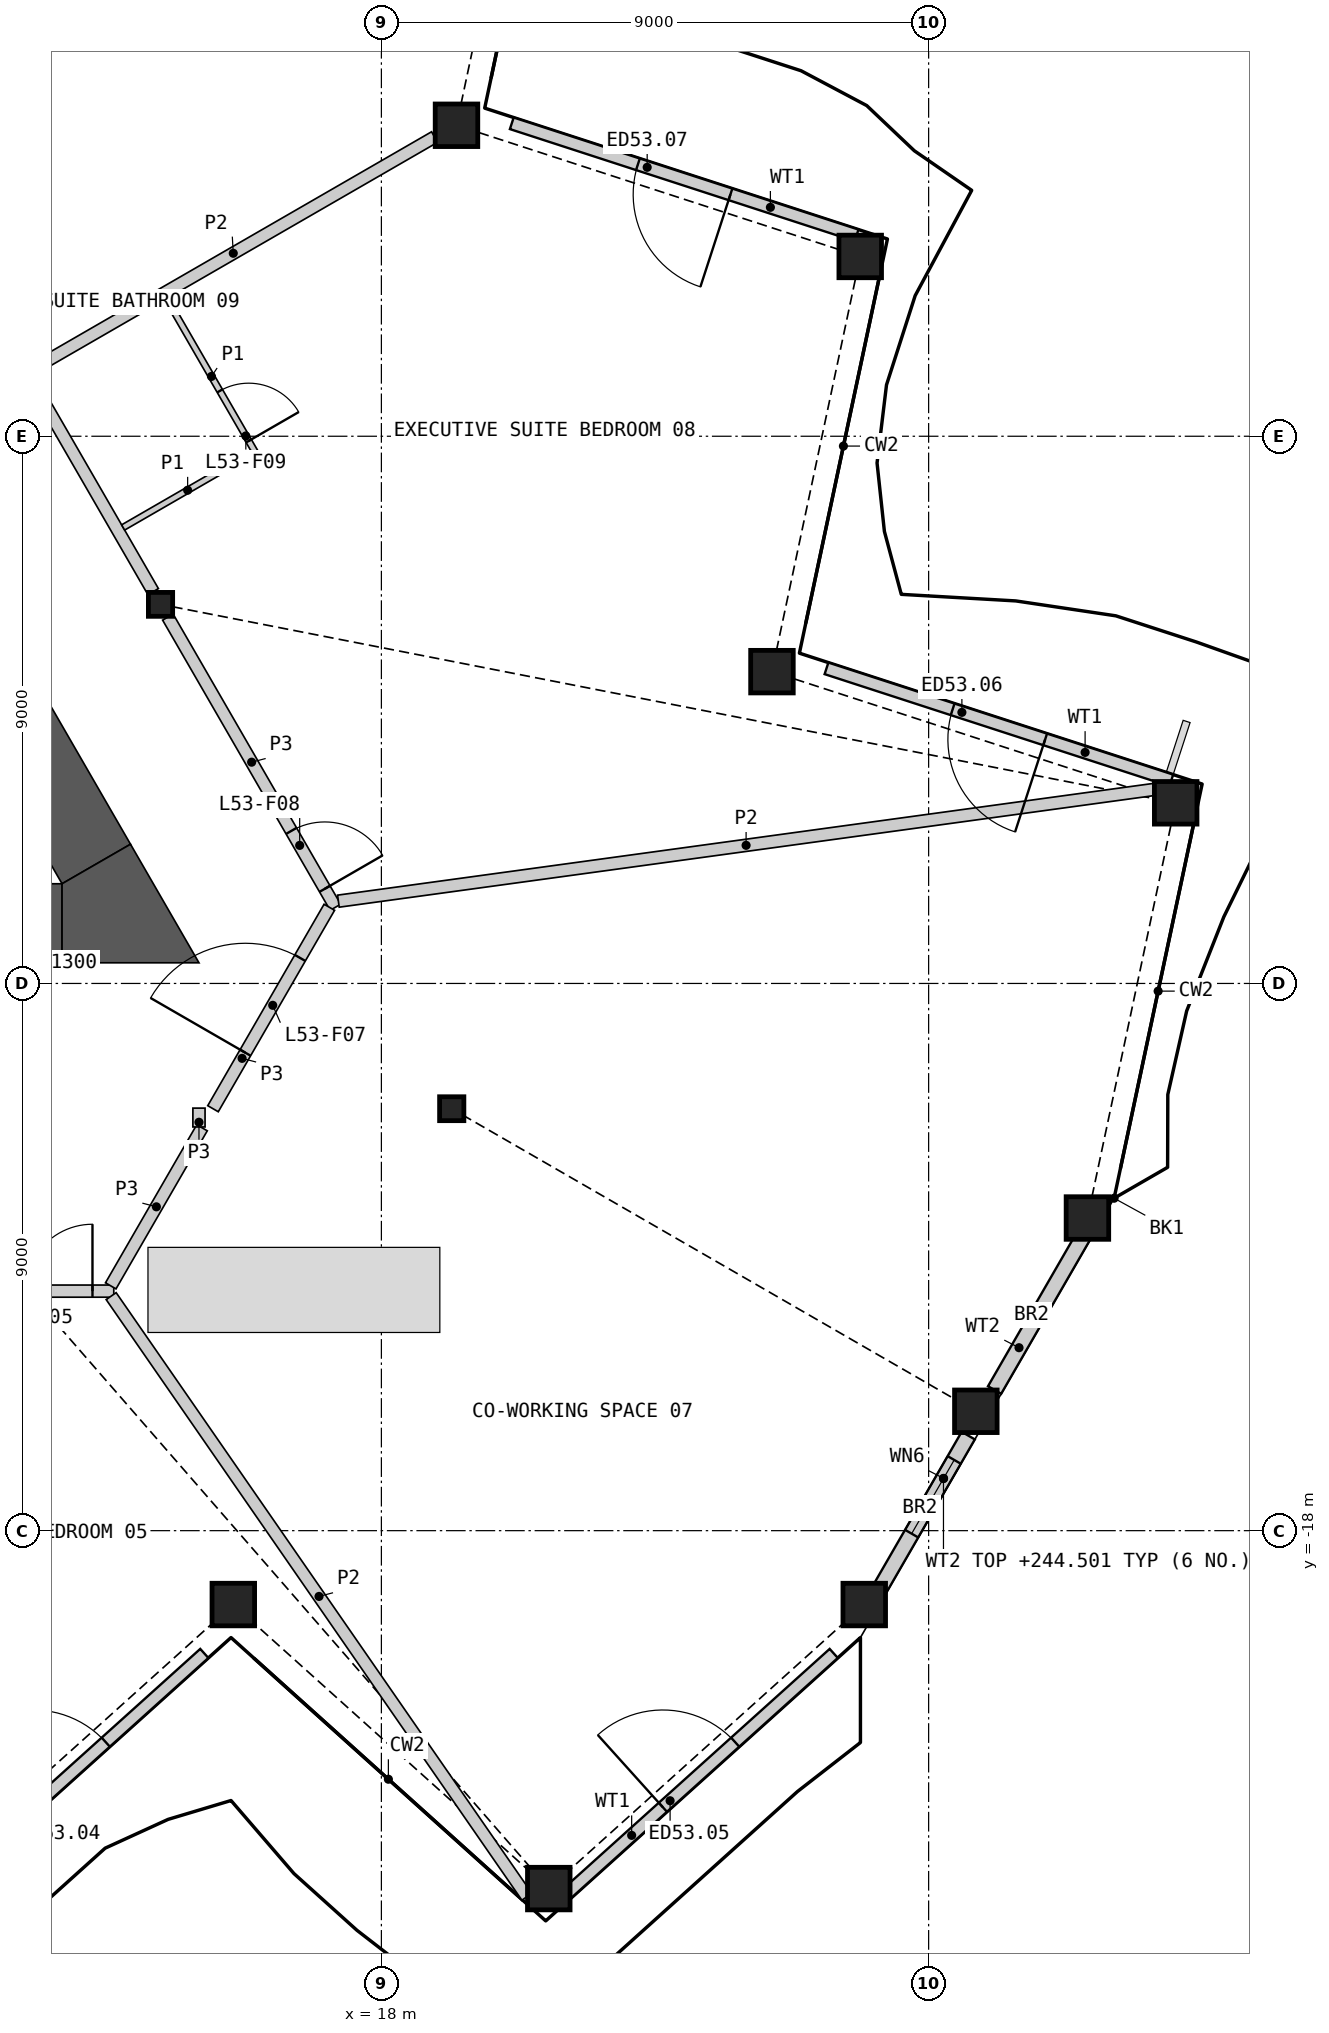
"""IFC4 building model, lengths in metres.
Left out: names, types, materials, properties, quantities, classifications, styles, units other than length and angle.
Written with IfcOpenShell. Run it as: python <this file> out.ifc"""

import sys

from ifc_helpers import new_model, si_unit, direction, frame, frame_2d, origin, origin_2d, place, context, subcontext, project, spatial, polyline, rectangle, hollow_rectangle, i_section, outline, extrude, element, fill, save


model = new_model("IFC4")
c1 = context("Model", 3, precision=1e-05, world=origin(), true_north=direction((0.0, 1.0)))
c2 = subcontext(c1, "Body", "Model", "MODEL_VIEW")
j1 = project(units=[si_unit("LENGTHUNIT", "METRE"), si_unit("PLANEANGLEUNIT", "RADIAN")], contexts=[c1])
p1 = place(None, origin())
s1 = spatial("IfcSite", under=j1, at=p1, CompositionType="ELEMENT")
p2 = place(p1, origin())
s2 = spatial("IfcBuilding", under=s1, at=p2, CompositionType="ELEMENT")
p3 = place(p2, frame((0.0, 0.0, 241.8)))
s3 = spatial("IfcBuildingStorey", under=s2, at=p3, CompositionType="ELEMENT", Elevation=241.8)
for number, where, z_axis, x_axis in (
    (1, (15.565, -19.215, 0.0), (0.0, 0.0, 1.0), (1.0, 0.0, 0.0)),
    (2, (20.753, -23.887, 0.0), (0.0, 0.0, 1.0), (1.0, 0.0, 0.0)),
    (3, (25.941, -19.215, 0.0), (0.0, 0.0, 1.0), (1.0, 0.0, 0.0)),
    (4, (27.776, -16.037, 0.0), (0.0, 0.0, 1.0), (1.0, 0.0, 0.0)),
    (5, (29.612, -12.858, 0.0), (0.0, 0.0, 1.0), (1.0, 0.0, 0.0)),
    (6, (31.063, -6.029, 0.0), (0.0, 0.0, 1.0), (1.0, 0.0, 0.0)),
    (7, (24.423, -3.872, 0.0), (0.0, 0.0, 1.0), (1.0, 0.0, 0.0)),
    (8, (25.875, 2.957, 0.0), (0.0, 0.0, 1.0), (1.0, 0.0, 0.0)),
    (9, (19.235, 5.115, 0.0), (0.0, 0.0, 1.0), (1.0, 0.0, 0.0)),
):
    element("IfcColumn", number, at=place(p3, frame(where, z_axis=z_axis, x_axis=x_axis)), inside=s3, PredefinedType="COLUMN", context=c2, shape_type="SweptSolid", body=[
        extrude(hollow_rectangle(XDim=0.7, YDim=0.7, WallThickness=0.045, at=origin_2d()), origin(), (0.0, 0.0, 1.0), 3.6),
    ])
for number, where, z_axis, x_axis in (
    (10, (19.157, -11.06, 0.0), (0.0, 0.0, 1.0), (1.0, 0.0, 0.0)),
    (11, (14.368, -2.765, 0.0), (0.0, 0.0, 1.0), (1.0, 0.0, 0.0)),
):
    element("IfcColumn", number, at=place(p3, frame(where, z_axis=z_axis, x_axis=x_axis)), inside=s3, PredefinedType="COLUMN", context=c2, shape_type="SweptSolid", body=[
        extrude(i_section(OverallWidth=0.399, OverallDepth=0.393, WebThickness=0.023, FlangeThickness=0.037, at=origin_2d()), origin(), (0.0, 0.0, 1.0), 3.6),
    ])
p4 = place(p3, frame((10.657, -24.009, 0.0), z_axis=(0.0, 0.0, 1.0), x_axis=(0.74315161366, 0.669123067241, 0.0)))
e12 = element("IfcWall", 12, at=p4, inside=s3, PredefinedType="SOLIDWALL", context=c2, shape_type="SweptSolid", body=[
    extrude(rectangle(XDim=5.963, YDim=0.2, at=frame_2d((2.981, 0.0))), origin(), (0.0, 0.0, 1.0), 2.701),
])
p5 = place(p4, frame((2.181, 0.0, 0.0)))
e13 = element("IfcOpeningElement", 13, at=p5, cuts=e12, PredefinedType="OPENING", context=c2, shape_type="SweptSolid", body=[
    extrude(rectangle(XDim=1.6, YDim=2.4, at=frame_2d((0.8, 1.2))), frame((0.0, 0.11, 0.0), z_axis=(0.0, -1.0, 0.0), x_axis=(1.0, 0.0, 0.0)), (0.0, 0.0, 1.0), 0.22),
])
p6 = place(p3, frame((21.008, -24.009, 0.0), z_axis=(0.0, 0.0, 1.0), x_axis=(0.743133280699, 0.669143427912, 0.0)))
e14 = element("IfcWall", 14, at=p6, inside=s3, PredefinedType="SOLIDWALL", context=c2, shape_type="SweptSolid", body=[
    extrude(rectangle(XDim=5.962, YDim=0.2, at=frame_2d((2.981, 0.0))), origin(), (0.0, 0.0, 1.0), 2.701),
])
p7 = place(p6, frame((2.181, 0.0, 0.0)))
e15 = element("IfcOpeningElement", 15, at=p7, cuts=e14, PredefinedType="OPENING", context=c2, shape_type="SweptSolid", body=[
    extrude(rectangle(XDim=1.6, YDim=2.4, at=frame_2d((0.8, 1.2))), frame((0.0, 0.11, 0.0), z_axis=(0.0, -1.0, 0.0), x_axis=(1.0, 0.0, 0.0)), (0.0, 0.0, 1.0), 0.22),
])
p8 = place(p3, frame((26.021, -19.262, 0.0), z_axis=(0.0, 0.0, 1.0), x_axis=(0.500026945261, 0.866009846372, 0.0)))
e16 = element("IfcWall", 16, at=p8, inside=s3, PredefinedType="SOLIDWALL", context=c2, shape_type="SweptSolid", body=[
    extrude(rectangle(XDim=3.262, YDim=0.25, at=frame_2d((1.631, 0.0))), origin(), (0.0, 0.0, 1.0), 2.701),
])
p9 = place(p8, frame((1.4, 0.0, 1.9)))
e17 = element("IfcOpeningElement", 17, at=p9, cuts=e16, PredefinedType="OPENING", context=c2, shape_type="SweptSolid", body=[
    extrude(rectangle(XDim=1.4, YDim=0.6, at=frame_2d((0.7, 0.3))), frame((0.0, 0.135, 0.0), z_axis=(0.0, -1.0, 0.0), x_axis=(1.0, 0.0, 0.0)), (0.0, 0.0, 1.0), 0.27),
])
p10 = place(p3, frame((28.085, -15.687, 0.0), z_axis=(0.0, 0.0, 1.0), x_axis=(0.499987708133, 0.866032500381, 0.0)))
e18 = element("IfcWall", 18, at=p10, inside=s3, PredefinedType="SOLIDWALL", context=c2, shape_type="SweptSolid", body=[
    extrude(rectangle(XDim=3.213, YDim=0.25, at=frame_2d((1.607, 0.0))), origin(), (0.0, 0.0, 1.0), 2.701),
])
p11 = place(p3, frame((30.991, -5.66, 0.0), z_axis=(0.0, 0.0, 1.0), x_axis=(-0.951055430656, 0.309020335608, 0.0)))
e19 = element("IfcWall", 19, at=p11, inside=s3, PredefinedType="SOLIDWALL", context=c2, shape_type="SweptSolid", body=[
    extrude(rectangle(XDim=5.962, YDim=0.2, at=frame_2d((2.981, 0.0))), origin(), (0.0, 0.0, 1.0), 2.701),
])
p12 = place(p11, frame((2.181, 0.0, 0.0)))
e20 = element("IfcOpeningElement", 20, at=p12, cuts=e19, PredefinedType="OPENING", context=c2, shape_type="SweptSolid", body=[
    extrude(rectangle(XDim=1.6, YDim=2.4, at=frame_2d((0.8, 1.2))), frame((0.0, 0.11, 0.0), z_axis=(0.0, -1.0, 0.0), x_axis=(1.0, 0.0, 0.0)), (0.0, 0.0, 1.0), 0.22),
])
p13 = place(p3, frame((25.815, 3.304, 0.0), z_axis=(0.0, 0.0, 1.0), x_axis=(-0.951055430656, 0.309020335608, 0.0)))
e21 = element("IfcWall", 21, at=p13, inside=s3, PredefinedType="SOLIDWALL", context=c2, shape_type="SweptSolid", body=[
    extrude(rectangle(XDim=5.962, YDim=0.2, at=frame_2d((2.981, 0.0))), origin(), (0.0, 0.0, 1.0), 2.701),
])
p14 = place(p13, frame((2.181, 0.0, 0.0)))
e22 = element("IfcOpeningElement", 22, at=p14, cuts=e21, PredefinedType="OPENING", context=c2, shape_type="SweptSolid", body=[
    extrude(rectangle(XDim=1.6, YDim=2.4, at=frame_2d((0.8, 1.2))), frame((0.0, 0.11, 0.0), z_axis=(0.0, -1.0, 0.0), x_axis=(1.0, 0.0, 0.0)), (0.0, 0.0, 1.0), 0.22),
])
p15 = place(p3, frame((8.488, -8.01, 0.0), z_axis=(0.0, 0.0, 1.0), x_axis=(1.0, 0.0, 0.0)))
e23 = element("IfcWall", 23, at=p15, inside=s3, PredefinedType="SHEAR", context=c2, shape_type="SweptSolid", body=[
    extrude(rectangle(XDim=4.26, YDim=1.3, at=frame_2d((2.13, 0.0))), origin(), (0.0, 0.0, 1.0), 3.25),
])
p16 = place(p3, frame((13.311, -7.035, 0.0), z_axis=(0.0, 0.0, 1.0), x_axis=(-0.500012574659, 0.86601814368, 0.0)))
e24 = element("IfcWall", 24, at=p16, inside=s3, PredefinedType="SHEAR", context=c2, shape_type="SweptSolid", body=[
    extrude(rectangle(XDim=4.298, YDim=1.3, at=frame_2d((2.149, 0.0))), origin(), (0.0, 0.0, 1.0), 3.25),
])
p17 = place(p3, origin())
e25 = element("IfcWall", 25, at=p17, inside=s3, PredefinedType="SHEAR", context=c2, shape_type="SweptSolid", body=[
    extrude(outline(polyline([(12.748, -8.66), (12.748, -7.36), (13.874, -6.71), (15.0, -8.66), (12.748, -8.66)])), origin(), (0.0, 0.0, 1.0), 3.25),
])
p18 = place(p3, frame((-13.599, -14.06, 0.0), z_axis=(0.0, 0.0, 1.0), x_axis=(1.0, 0.0, 0.0)))
e26 = element("IfcWall", 26, at=p18, inside=s3, PredefinedType="PARTITIONING", context=c2, shape_type="SweptSolid", body=[
    extrude(rectangle(XDim=27.198, YDim=0.2, at=frame_2d((13.599, 0.0))), origin(), (0.0, 0.0, 1.0), 3.25),
])
p19 = place(p18, frame((1.152, 0.0, 0.0)))
e27 = element("IfcOpeningElement", 27, at=p19, cuts=e26, PredefinedType="OPENING", context=c2, shape_type="SweptSolid", body=[
    extrude(rectangle(XDim=0.95, YDim=2.1, at=frame_2d((0.475, 1.05))), frame((0.0, 0.11, 0.0), z_axis=(0.0, -1.0, 0.0), x_axis=(1.0, 0.0, 0.0)), (0.0, 0.0, 1.0), 0.22),
])
p20 = place(p18, frame((16.311, 0.0, 0.0)))
e28 = element("IfcOpeningElement", 28, at=p20, cuts=e26, PredefinedType="OPENING", context=c2, shape_type="SweptSolid", body=[
    extrude(rectangle(XDim=1.1, YDim=2.1, at=frame_2d((0.55, 1.05))), frame((0.0, 0.11, 0.0), z_axis=(0.0, -1.0, 0.0), x_axis=(1.0, 0.0, 0.0)), (0.0, 0.0, 1.0), 0.22),
])
p21 = place(p18, frame((25.747, 0.0, 0.0)))
e29 = element("IfcOpeningElement", 29, at=p21, cuts=e26, PredefinedType="OPENING", context=c2, shape_type="SweptSolid", body=[
    extrude(rectangle(XDim=1.1, YDim=2.1, at=frame_2d((0.55, 1.05))), frame((0.0, 0.11, 0.0), z_axis=(0.0, -1.0, 0.0), x_axis=(1.0, 0.0, 0.0)), (0.0, 0.0, 1.0), 0.22),
])
p22 = place(p3, frame((9.699, 5.321, 0.0), z_axis=(0.0, 0.0, 1.0), x_axis=(0.49998193945, -0.866035830797, 0.0)))
e30 = element("IfcWall", 30, at=p22, inside=s3, PredefinedType="PARTITIONING", context=c2, shape_type="SweptSolid", body=[
    extrude(rectangle(XDim=9.094, YDim=0.2, at=frame_2d((4.547, 0.0))), origin(), (0.0, 0.0, 1.0), 3.25),
])
p23 = place(p3, frame((14.489, -2.975, 0.0), z_axis=(0.0, 0.0, 1.0), x_axis=(0.500017753321, -0.866015153657, 0.0)))
e31 = element("IfcWall", 31, at=p23, inside=s3, PredefinedType="PARTITIONING", context=c2, shape_type="SweptSolid", body=[
    extrude(rectangle(XDim=5.51, YDim=0.2, at=frame_2d((2.755, 0.0))), origin(), (0.0, 0.0, 1.0), 3.25),
])
p24 = place(p23, frame((4.06, 0.0, 0.0)))
e32 = element("IfcOpeningElement", 32, at=p24, cuts=e31, PredefinedType="OPENING", context=c2, shape_type="SweptSolid", body=[
    extrude(rectangle(XDim=1.1, YDim=2.1, at=frame_2d((0.55, 1.05))), frame((0.0, 0.11, 0.0), z_axis=(0.0, -1.0, 0.0), x_axis=(1.0, 0.0, 0.0)), (0.0, 0.0, 1.0), 0.22),
])
p25 = place(p3, frame((15.231, -11.06, 0.0), z_axis=(0.0, 0.0, 1.0), x_axis=(0.499961815444, 0.866047448526, 0.0)))
e33 = element("IfcWall", 33, at=p25, inside=s3, PredefinedType="PARTITIONING", context=c2, shape_type="SweptSolid", body=[
    extrude(rectangle(XDim=3.826, YDim=0.2, at=frame_2d((1.913, 0.0))), origin(), (0.0, 0.0, 1.0), 3.25),
])
p26 = place(p25, frame((1.064, 0.0, 0.0)))
e34 = element("IfcOpeningElement", 34, at=p26, cuts=e33, PredefinedType="OPENING", context=c2, shape_type="SweptSolid", body=[
    extrude(rectangle(XDim=1.8, YDim=2.1, at=frame_2d((0.9, 1.05))), frame((0.0, 0.11, 0.0), z_axis=(0.0, -1.0, 0.0), x_axis=(1.0, 0.0, 0.0)), (0.0, 0.0, 1.0), 0.22),
])
p27 = place(p3, frame((13.549, -13.974, 0.0), z_axis=(0.0, 0.0, 1.0), x_axis=(0.500048608389, 0.865997337899, 0.0)))
e35 = element("IfcWall", 35, at=p27, inside=s3, PredefinedType="PARTITIONING", context=c2, shape_type="SweptSolid", body=[
    extrude(rectangle(XDim=3.002, YDim=0.2, at=frame_2d((1.501, 0.0))), origin(), (0.0, 0.0, 1.0), 3.25),
])
p28 = place(p3, frame((15.0, -11.36, 0.0), z_axis=(0.0, 0.0, 1.0), x_axis=(0.0, 1.0, 0.0)))
e36 = element("IfcWall", 36, at=p28, inside=s3, PredefinedType="PARTITIONING", context=c2, shape_type="SweptSolid", body=[
    extrude(rectangle(XDim=0.31, YDim=0.2, at=frame_2d((0.155, 0.0))), origin(), (0.0, 0.0, 1.0), 3.25),
])
p29 = place(p3, frame((17.293, -7.646, 0.0), z_axis=(0.0, 0.0, 1.0), x_axis=(0.99075075074, 0.135694325259, 0.0)))
e37 = element("IfcWall", 37, at=p29, inside=s3, PredefinedType="PARTITIONING", context=c2, shape_type="SweptSolid", body=[
    extrude(rectangle(XDim=13.535, YDim=0.2, at=frame_2d((6.768, 0.0))), origin(), (0.0, 0.0, 1.0), 2.404),
])
p30 = place(p3, frame((13.556, -14.143, 0.0), z_axis=(0.0, 0.0, 1.0), x_axis=(0.56913494803, -0.82224413098, 0.0)))
e38 = element("IfcWall", 38, at=p30, inside=s3, PredefinedType="PARTITIONING", context=c2, shape_type="SweptSolid", body=[
    extrude(rectangle(XDim=12.014, YDim=0.2, at=frame_2d((6.007, 0.0))), origin(), (0.0, 0.0, 1.0), 2.404),
])
p31 = place(p3, frame((12.253, 1.098, 0.0), z_axis=(0.0, 0.0, 1.0), x_axis=(0.866026077102, 0.499998833779, 0.0)))
e39 = element("IfcWall", 39, at=p31, inside=s3, PredefinedType="PARTITIONING", context=c2, shape_type="SweptSolid", body=[
    extrude(rectangle(XDim=7.646, YDim=0.2, at=frame_2d((3.823, 0.0))), origin(), (0.0, 0.0, 1.0), 2.404),
])
p32 = place(p3, frame((14.468, 2.261, 0.0), z_axis=(0.0, 0.0, 1.0), x_axis=(0.500037662692, -0.866003658127, 0.0)))
e40 = element("IfcWall", 40, at=p32, inside=s3, PredefinedType="PARTITIONING", context=c2, shape_type="SweptSolid", body=[
    extrude(rectangle(XDim=2.95, YDim=0.1, at=frame_2d((1.475, 0.0))), origin(), (0.0, 0.0, 1.0), 2.404),
])
p33 = place(p32, frame((1.75, 0.0, 0.0)))
e41 = element("IfcOpeningElement", 41, at=p33, cuts=e40, PredefinedType="OPENING", context=c2, shape_type="SweptSolid", body=[
    extrude(rectangle(XDim=0.95, YDim=2.1, at=frame_2d((0.475, 1.05))), frame((0.0, 0.06, 0.0), z_axis=(0.0, -1.0, 0.0), x_axis=(1.0, 0.0, 0.0)), (0.0, 0.0, 1.0), 0.12),
])
p34 = place(p3, frame((13.753, -1.5, 0.0), z_axis=(0.0, 0.0, 1.0), x_axis=(0.866014668023, 0.500018594424, 0.0)))
e42 = element("IfcWall", 42, at=p34, inside=s3, PredefinedType="PARTITIONING", context=c2, shape_type="SweptSolid", body=[
    extrude(rectangle(XDim=2.45, YDim=0.1, at=frame_2d((1.225, 0.0))), origin(), (0.0, 0.0, 1.0), 2.404),
])
p35 = place(p5, origin())
e43 = element("IfcDoor", 43, at=p35, inside=s3, OperationType="DOUBLE_DOOR_SINGLE_SWING", PredefinedType="DOOR", context=c2, shape_type="SweptSolid", body=[
    extrude(rectangle(XDim=1.6, YDim=2.4, at=frame_2d((0.8, 1.2))), frame((0.0, 0.025, 0.0), z_axis=(0.0, -1.0, 0.0), x_axis=(1.0, 0.0, 0.0)), (0.0, 0.0, 1.0), 0.05),
])
fill(e13, e43)
p36 = place(p7, origin())
e44 = element("IfcDoor", 44, at=p36, inside=s3, OperationType="DOUBLE_DOOR_SINGLE_SWING", PredefinedType="DOOR", context=c2, shape_type="SweptSolid", body=[
    extrude(rectangle(XDim=1.6, YDim=2.4, at=frame_2d((0.8, 1.2))), frame((0.0, 0.025, 0.0), z_axis=(0.0, -1.0, 0.0), x_axis=(1.0, 0.0, 0.0)), (0.0, 0.0, 1.0), 0.05),
])
fill(e15, e44)
p37 = place(p9, origin())
e45 = element("IfcWindow", 45, at=p37, inside=s3, PartitioningType="SINGLE_PANEL", PredefinedType="WINDOW", context=c2, shape_type="SweptSolid", body=[
    extrude(rectangle(XDim=1.4, YDim=0.6, at=frame_2d((0.7, 0.3))), frame((0.0, 0.03, 0.0), z_axis=(0.0, -1.0, 0.0), x_axis=(1.0, 0.0, 0.0)), (0.0, 0.0, 1.0), 0.06),
])
fill(e17, e45)
p38 = place(p12, origin())
e46 = element("IfcDoor", 46, at=p38, inside=s3, OperationType="DOUBLE_DOOR_SINGLE_SWING", PredefinedType="DOOR", context=c2, shape_type="SweptSolid", body=[
    extrude(rectangle(XDim=1.6, YDim=2.4, at=frame_2d((0.8, 1.2))), frame((0.0, 0.025, 0.0), z_axis=(0.0, -1.0, 0.0), x_axis=(1.0, 0.0, 0.0)), (0.0, 0.0, 1.0), 0.05),
])
fill(e20, e46)
p39 = place(p14, origin())
e47 = element("IfcDoor", 47, at=p39, inside=s3, OperationType="DOUBLE_DOOR_SINGLE_SWING", PredefinedType="DOOR", context=c2, shape_type="SweptSolid", body=[
    extrude(rectangle(XDim=1.6, YDim=2.4, at=frame_2d((0.8, 1.2))), frame((0.0, 0.025, 0.0), z_axis=(0.0, -1.0, 0.0), x_axis=(1.0, 0.0, 0.0)), (0.0, 0.0, 1.0), 0.05),
])
fill(e22, e47)
p40 = place(p21, origin())
e48 = element("IfcDoor", 48, at=p40, inside=s3, OperationType="SINGLE_SWING_RIGHT", PredefinedType="DOOR", context=c2, shape_type="SweptSolid", body=[
    extrude(rectangle(XDim=1.1, YDim=2.1, at=frame_2d((0.55, 1.05))), frame((0.0, 0.025, 0.0), z_axis=(0.0, -1.0, 0.0), x_axis=(1.0, 0.0, 0.0)), (0.0, 0.0, 1.0), 0.05),
])
fill(e29, e48)
p41 = place(p26, origin())
e49 = element("IfcDoor", 49, at=p41, inside=s3, OperationType="DOUBLE_DOOR_SINGLE_SWING", PredefinedType="DOOR", context=c2, shape_type="SweptSolid", body=[
    extrude(rectangle(XDim=1.8, YDim=2.1, at=frame_2d((0.9, 1.05))), frame((0.0, 0.025, 0.0), z_axis=(0.0, -1.0, 0.0), x_axis=(1.0, 0.0, 0.0)), (0.0, 0.0, 1.0), 0.05),
])
fill(e34, e49)
p42 = place(p24, origin())
e50 = element("IfcDoor", 50, at=p42, inside=s3, OperationType="SINGLE_SWING_RIGHT", PredefinedType="DOOR", context=c2, shape_type="SweptSolid", body=[
    extrude(rectangle(XDim=1.1, YDim=2.1, at=frame_2d((0.55, 1.05))), frame((0.0, 0.025, 0.0), z_axis=(0.0, -1.0, 0.0), x_axis=(1.0, 0.0, 0.0)), (0.0, 0.0, 1.0), 0.05),
])
fill(e32, e50)
p43 = place(p33, origin())
e51 = element("IfcDoor", 51, at=p43, inside=s3, OperationType="SINGLE_SWING_RIGHT", PredefinedType="DOOR", context=c2, shape_type="SweptSolid", body=[
    extrude(rectangle(XDim=0.95, YDim=2.1, at=frame_2d((0.475, 1.05))), frame((0.0, 0.025, 0.0), z_axis=(0.0, -1.0, 0.0), x_axis=(1.0, 0.0, 0.0)), (0.0, 0.0, 1.0), 0.05),
])
fill(e41, e51)
save(model, sys.argv[1])
